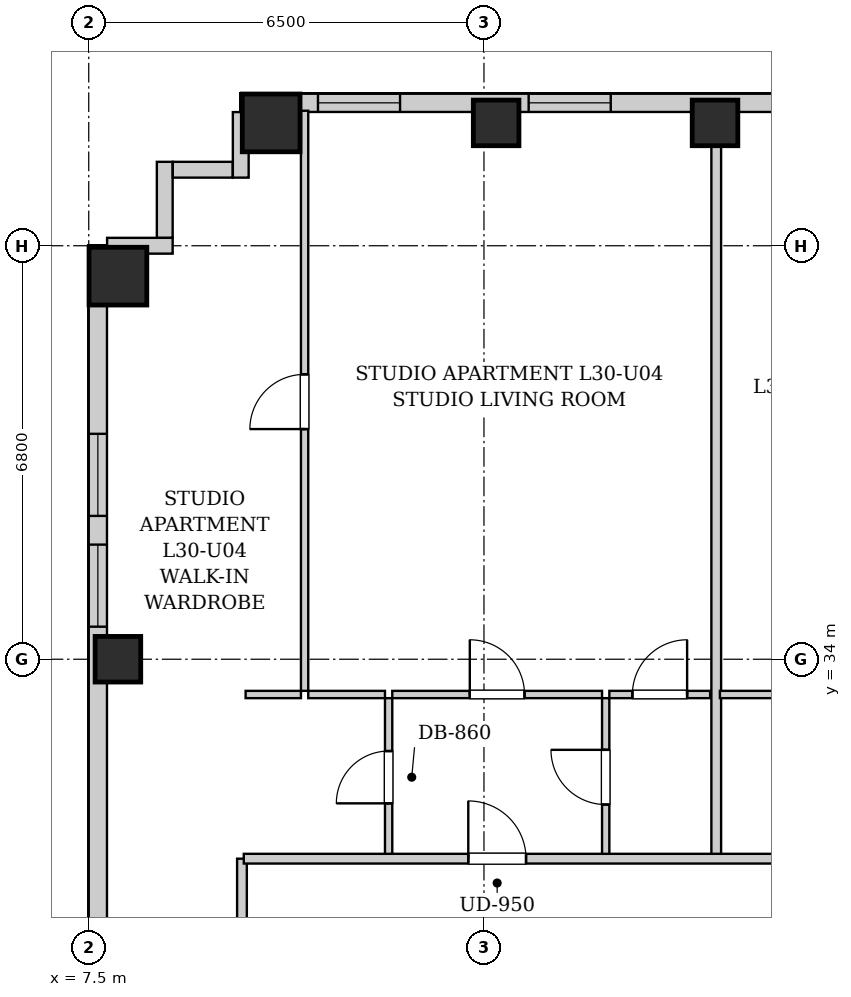
"""IFC4 building model, lengths in metres.
Left out: names, types, materials, properties, quantities, classifications, styles, units other than length and angle.
Written with IfcOpenShell. Run it as: python <this file> out.ifc"""

import sys

from ifc_helpers import new_model, si_unit, direction, frame, frame_2d, origin, origin_2d, place, context, subcontext, project, spatial, rectangle, extrude, element, fill, save


model = new_model("IFC4")
c1 = context("Model", 3, precision=1e-05, world=origin(), true_north=direction((0.0, 1.0)))
c2 = subcontext(c1, "Body", "Model", "MODEL_VIEW")
j1 = project(units=[si_unit("LENGTHUNIT", "METRE"), si_unit("PLANEANGLEUNIT", "RADIAN")], contexts=[c1])
p1 = place(None, origin())
s1 = spatial("IfcSite", under=j1, at=p1, CompositionType="ELEMENT")
p2 = place(p1, origin())
s2 = spatial("IfcBuilding", under=s1, at=p2, CompositionType="ELEMENT")
p3 = place(p2, frame((0.0, 0.0, 107.1)))
s3 = spatial("IfcBuildingStorey", under=s2, at=p3, CompositionType="ELEMENT", Elevation=107.1)
p4 = place(p3, frame((10.5, 42.82, 0.0), z_axis=(0.0, 0.0, 1.0), x_axis=(1.0, 0.0, 0.0)))
e1 = element("IfcColumn", 1, at=p4, inside=s3, PredefinedType="COLUMN", context=c2, shape_type="SweptSolid", body=[
    extrude(rectangle(XDim=0.95, YDim=0.95, at=origin_2d()), origin(), (0.0, 0.0, 1.0), 3.2),
])
for number, where, z_axis, x_axis in (
    (2, (14.2, 42.82, 0.0), (0.0, 0.0, 1.0), (1.0, 0.0, 0.0)),
    (3, (17.8, 42.82, 0.0), (0.0, 0.0, 1.0), (1.0, 0.0, 0.0)),
    (4, (7.98, 34.0, 0.0), (0.0, 0.0, 1.0), (1.0, 0.0, 0.0)),
):
    element("IfcColumn", number, at=place(p3, frame(where, z_axis=z_axis, x_axis=x_axis)), inside=s3, PredefinedType="COLUMN", context=c2, shape_type="SweptSolid", body=[
        extrude(rectangle(XDim=0.75, YDim=0.75, at=origin_2d()), origin(), (0.0, 0.0, 1.0), 3.2),
    ])
p5 = place(p3, frame((7.98, 40.3, 0.0), z_axis=(0.0, 0.0, 1.0), x_axis=(1.0, 0.0, 0.0)))
e5 = element("IfcColumn", 5, at=p5, inside=s3, PredefinedType="COLUMN", context=c2, shape_type="SweptSolid", body=[
    extrude(rectangle(XDim=0.95, YDim=0.95, at=origin_2d()), origin(), (0.0, 0.0, 1.0), 3.2),
])
p6 = place(p3, frame((10.0, 43.15, 0.0), z_axis=(0.0, 0.0, 1.0), x_axis=(1.0, 0.0, 0.0)))
e6 = element("IfcWall", 6, at=p6, inside=s3, PredefinedType="SOLIDWALL", context=c2, shape_type="SweptSolid", body=[
    extrude(rectangle(XDim=23.15, YDim=0.3, at=frame_2d((11.575, 0.0))), origin(), (0.0, 0.0, 1.0), 2.94),
])
p7 = place(p6, frame((4.735, 0.0, 0.55)))
e7 = element("IfcOpeningElement", 7, at=p7, cuts=e6, PredefinedType="OPENING", context=c2, shape_type="SweptSolid", body=[
    extrude(rectangle(XDim=1.35, YDim=1.2, at=frame_2d((0.675, 0.6))), frame((0.0, 0.16, 0.0), z_axis=(0.0, -1.0, 0.0), x_axis=(1.0, 0.0, 0.0)), (0.0, 0.0, 1.0), 0.32),
])
p8 = place(p6, frame((1.27, 0.0, 0.55)))
e8 = element("IfcOpeningElement", 8, at=p8, cuts=e6, PredefinedType="OPENING", context=c2, shape_type="SweptSolid", body=[
    extrude(rectangle(XDim=1.35, YDim=1.2, at=frame_2d((0.675, 0.6))), frame((0.0, 0.16, 0.0), z_axis=(0.0, -1.0, 0.0), x_axis=(1.0, 0.0, 0.0)), (0.0, 0.0, 1.0), 0.32),
])
p9 = place(p6, frame((9.773, 0.0, 0.55)))
e9 = element("IfcOpeningElement", 9, at=p9, cuts=e6, PredefinedType="OPENING", context=c2, shape_type="SweptSolid", body=[
    extrude(rectangle(XDim=1.35, YDim=1.2, at=frame_2d((0.675, 0.6))), frame((0.0, 0.16, 0.0), z_axis=(0.0, -1.0, 0.0), x_axis=(1.0, 0.0, 0.0)), (0.0, 0.0, 1.0), 0.32),
])
p10 = place(p6, frame((17.5, 0.0, 0.55)))
e10 = element("IfcOpeningElement", 10, at=p10, cuts=e6, PredefinedType="OPENING", context=c2, shape_type="SweptSolid", body=[
    extrude(rectangle(XDim=0.85, YDim=1.2, at=frame_2d((0.425, 0.6))), frame((0.0, 0.16, 0.0), z_axis=(0.0, -1.0, 0.0), x_axis=(1.0, 0.0, 0.0)), (0.0, 0.0, 1.0), 0.32),
])
p11 = place(p6, frame((19.393, 0.0, 0.55)))
e11 = element("IfcOpeningElement", 11, at=p11, cuts=e6, PredefinedType="OPENING", context=c2, shape_type="SweptSolid", body=[
    extrude(rectangle(XDim=1.35, YDim=1.2, at=frame_2d((0.675, 0.6))), frame((0.0, 0.16, 0.0), z_axis=(0.0, -1.0, 0.0), x_axis=(1.0, 0.0, 0.0)), (0.0, 0.0, 1.0), 0.32),
])
p12 = place(p3, frame((7.65, 19.4, 0.0), z_axis=(0.0, 0.0, 1.0), x_axis=(0.0, 1.0, 0.0)))
e12 = element("IfcWall", 12, at=p12, inside=s3, PredefinedType="SOLIDWALL", context=c2, shape_type="SweptSolid", body=[
    extrude(rectangle(XDim=21.4, YDim=0.3, at=frame_2d((10.7, 0.0))), origin(), (0.0, 0.0, 1.0), 2.94),
])
p13 = place(p12, frame((16.957, 0.0, 0.55)))
e13 = element("IfcOpeningElement", 13, at=p13, cuts=e12, PredefinedType="OPENING", context=c2, shape_type="SweptSolid", body=[
    extrude(rectangle(XDim=1.35, YDim=1.2, at=frame_2d((0.675, 0.6))), frame((0.0, 0.16, 0.0), z_axis=(0.0, -1.0, 0.0), x_axis=(1.0, 0.0, 0.0)), (0.0, 0.0, 1.0), 0.32),
])
p14 = place(p12, frame((15.135, 0.0, 0.55)))
e14 = element("IfcOpeningElement", 14, at=p14, cuts=e12, PredefinedType="OPENING", context=c2, shape_type="SweptSolid", body=[
    extrude(rectangle(XDim=1.35, YDim=1.2, at=frame_2d((0.675, 0.6))), frame((0.0, 0.16, 0.0), z_axis=(0.0, -1.0, 0.0), x_axis=(1.0, 0.0, 0.0)), (0.0, 0.0, 1.0), 0.32),
])
p15 = place(p3, frame((7.802, 40.8, 0.0), z_axis=(0.0, 0.0, 1.0), x_axis=(1.0, 0.0, 0.0)))
e15 = element("IfcWall", 15, at=p15, inside=s3, PredefinedType="SOLIDWALL", context=c2, shape_type="SweptSolid", body=[
    extrude(rectangle(XDim=1.078, YDim=0.26, at=frame_2d((0.539, 0.0))), origin(), (0.0, 0.0, 1.0), 2.94),
])
p16 = place(p3, frame((8.75, 40.932, 0.0), z_axis=(0.0, 0.0, 1.0), x_axis=(0.0, 1.0, 0.0)))
e16 = element("IfcWall", 16, at=p16, inside=s3, PredefinedType="SOLIDWALL", context=c2, shape_type="SweptSolid", body=[
    extrude(rectangle(XDim=1.248, YDim=0.26, at=frame_2d((0.624, 0.0))), origin(), (0.0, 0.0, 1.0), 2.94),
])
p17 = place(p3, frame((8.882, 42.05, 0.0), z_axis=(0.0, 0.0, 1.0), x_axis=(1.0, 0.0, 0.0)))
e17 = element("IfcWall", 17, at=p17, inside=s3, PredefinedType="SOLIDWALL", context=c2, shape_type="SweptSolid", body=[
    extrude(rectangle(XDim=0.986, YDim=0.26, at=frame_2d((0.493, 0.0))), origin(), (0.0, 0.0, 1.0), 2.94),
])
p18 = place(p3, frame((10.0, 41.92, 0.0), z_axis=(0.0, 0.0, 1.0), x_axis=(0.0, 1.0, 0.0)))
e18 = element("IfcWall", 18, at=p18, inside=s3, PredefinedType="SOLIDWALL", context=c2, shape_type="SweptSolid", body=[
    extrude(rectangle(XDim=1.078, YDim=0.26, at=frame_2d((0.539, 0.0))), origin(), (0.0, 0.0, 1.0), 2.94),
])
p19 = place(p3, frame((10.02, 28.98, 0.0), z_axis=(0.0, 0.0, 1.0), x_axis=(0.0, 1.0, 0.0)))
e19 = element("IfcWall", 19, at=p19, inside=s3, PredefinedType="PARTITIONING", context=c2, shape_type="SweptSolid", body=[
    extrude(rectangle(XDim=1.74, YDim=0.16, at=frame_2d((0.87, 0.0))), origin(), (0.0, 0.0, 1.0), 2.94),
])
p20 = place(p3, frame((12.432, 30.76, 0.0), z_axis=(0.0, 0.0, 1.0), x_axis=(0.0, 1.0, 0.0)))
e20 = element("IfcWall", 20, at=p20, inside=s3, PredefinedType="PARTITIONING", context=c2, shape_type="SweptSolid", body=[
    extrude(rectangle(XDim=2.6, YDim=0.12, at=frame_2d((1.3, 0.0))), origin(), (0.0, 0.0, 1.0), 2.94),
])
p21 = place(p20, frame((0.87, 0.0, 0.0)))
e21 = element("IfcOpeningElement", 21, at=p21, cuts=e20, PredefinedType="OPENING", context=c2, shape_type="SweptSolid", body=[
    extrude(rectangle(XDim=0.86, YDim=2.05, at=frame_2d((0.43, 1.025))), frame((0.0, 0.07, 0.0), z_axis=(0.0, -1.0, 0.0), x_axis=(1.0, 0.0, 0.0)), (0.0, 0.0, 1.0), 0.14),
])
p22 = place(p3, frame((10.08, 33.42, 0.0), z_axis=(0.0, 0.0, 1.0), x_axis=(1.0, 0.0, 0.0)))
e22 = element("IfcWall", 22, at=p22, inside=s3, PredefinedType="PARTITIONING", context=c2, shape_type="SweptSolid", body=[
    extrude(rectangle(XDim=0.91, YDim=0.12, at=frame_2d((0.455, 0.0))), origin(), (0.0, 0.0, 1.0), 2.94),
])
p23 = place(p3, frame((11.11, 33.42, 0.0), z_axis=(0.0, 0.0, 1.0), x_axis=(1.0, 0.0, 0.0)))
e23 = element("IfcWall", 23, at=p23, inside=s3, PredefinedType="PARTITIONING", context=c2, shape_type="SweptSolid", body=[
    extrude(rectangle(XDim=1.262, YDim=0.12, at=frame_2d((0.631, 0.0))), origin(), (0.0, 0.0, 1.0), 2.94),
])
p24 = place(p3, frame((16.002, 30.76, 0.0), z_axis=(0.0, 0.0, 1.0), x_axis=(0.0, 1.0, 0.0)))
e24 = element("IfcWall", 24, at=p24, inside=s3, PredefinedType="PARTITIONING", context=c2, shape_type="SweptSolid", body=[
    extrude(rectangle(XDim=2.6, YDim=0.12, at=frame_2d((1.3, 0.0))), origin(), (0.0, 0.0, 1.0), 2.94),
])
p25 = place(p24, frame((0.85, 0.0, 0.0)))
e25 = element("IfcOpeningElement", 25, at=p25, cuts=e24, PredefinedType="OPENING", context=c2, shape_type="SweptSolid", body=[
    extrude(rectangle(XDim=0.9, YDim=2.05, at=frame_2d((0.45, 1.025))), frame((0.0, 0.07, 0.0), z_axis=(0.0, -1.0, 0.0), x_axis=(1.0, 0.0, 0.0)), (0.0, 0.0, 1.0), 0.14),
])
p26 = place(p3, frame((12.492, 33.42, 0.0), z_axis=(0.0, 0.0, 1.0), x_axis=(1.0, 0.0, 0.0)))
e26 = element("IfcWall", 26, at=p26, inside=s3, PredefinedType="PARTITIONING", context=c2, shape_type="SweptSolid", body=[
    extrude(rectangle(XDim=3.45, YDim=0.12, at=frame_2d((1.725, 0.0))), origin(), (0.0, 0.0, 1.0), 2.94),
])
p27 = place(p26, frame((1.275, 0.0, 0.0)))
e27 = element("IfcOpeningElement", 27, at=p27, cuts=e26, PredefinedType="OPENING", context=c2, shape_type="SweptSolid", body=[
    extrude(rectangle(XDim=0.9, YDim=2.05, at=frame_2d((0.45, 1.025))), frame((0.0, 0.07, 0.0), z_axis=(0.0, -1.0, 0.0), x_axis=(1.0, 0.0, 0.0)), (0.0, 0.0, 1.0), 0.14),
])
p28 = place(p3, frame((16.062, 33.42, 0.0), z_axis=(0.0, 0.0, 1.0), x_axis=(1.0, 0.0, 0.0)))
e28 = element("IfcWall", 28, at=p28, inside=s3, PredefinedType="PARTITIONING", context=c2, shape_type="SweptSolid", body=[
    extrude(rectangle(XDim=1.658, YDim=0.12, at=frame_2d((0.829, 0.0))), origin(), (0.0, 0.0, 1.0), 2.94),
])
p29 = place(p28, frame((0.379, 0.0, 0.0)))
e29 = element("IfcOpeningElement", 29, at=p29, cuts=e28, PredefinedType="OPENING", context=c2, shape_type="SweptSolid", body=[
    extrude(rectangle(XDim=0.9, YDim=2.05, at=frame_2d((0.45, 1.025))), frame((0.0, 0.07, 0.0), z_axis=(0.0, -1.0, 0.0), x_axis=(1.0, 0.0, 0.0)), (0.0, 0.0, 1.0), 0.14),
])
p30 = place(p3, frame((11.05, 33.48, 0.0), z_axis=(0.0, 0.0, 1.0), x_axis=(0.0, 1.0, 0.0)))
e30 = element("IfcWall", 30, at=p30, inside=s3, PredefinedType="PARTITIONING", context=c2, shape_type="SweptSolid", body=[
    extrude(rectangle(XDim=9.54, YDim=0.12, at=frame_2d((4.77, 0.0))), origin(), (0.0, 0.0, 1.0), 2.94),
])
p31 = place(p30, frame((4.305, 0.0, 0.0)))
e31 = element("IfcOpeningElement", 31, at=p31, cuts=e30, PredefinedType="OPENING", context=c2, shape_type="SweptSolid", body=[
    extrude(rectangle(XDim=0.9, YDim=2.05, at=frame_2d((0.45, 1.025))), frame((0.0, 0.07, 0.0), z_axis=(0.0, -1.0, 0.0), x_axis=(1.0, 0.0, 0.0)), (0.0, 0.0, 1.0), 0.14),
])
p32 = place(p3, frame((17.82, 30.76, 0.0), z_axis=(0.0, 0.0, 1.0), x_axis=(0.0, 1.0, 0.0)))
e32 = element("IfcWall", 32, at=p32, inside=s3, PredefinedType="PARTITIONING", context=c2, shape_type="SweptSolid", body=[
    extrude(rectangle(XDim=12.26, YDim=0.16, at=frame_2d((6.13, 0.0))), origin(), (0.0, 0.0, 1.0), 2.313),
])
p33 = place(p3, frame((17.88, 33.42, 0.0), z_axis=(0.0, 0.0, 1.0), x_axis=(1.0, 0.0, 0.0)))
e33 = element("IfcWall", 33, at=p33, inside=s3, PredefinedType="PARTITIONING", context=c2, shape_type="SweptSolid", body=[
    extrude(rectangle(XDim=1.85, YDim=0.12, at=frame_2d((0.925, 0.0))), origin(), (0.0, 0.0, 1.0), 2.94),
])
p34 = place(p3, frame((10.05, 30.72, 0.0), z_axis=(0.0, 0.0, 1.0), x_axis=(1.0, 0.0, 0.0)))
e34 = element("IfcWall", 34, at=p34, inside=s3, PredefinedType="PARTITIONING", context=c2, shape_type="SweptSolid", body=[
    extrude(rectangle(XDim=30.8, YDim=0.16, at=frame_2d((15.4, 0.0))), origin(), (0.0, 0.0, 1.0), 2.94),
])
p35 = place(p34, frame((3.692, 0.0, 0.0)))
e35 = element("IfcOpeningElement", 35, at=p35, cuts=e34, PredefinedType="OPENING", context=c2, shape_type="SweptSolid", body=[
    extrude(rectangle(XDim=0.95, YDim=2.1, at=frame_2d((0.475, 1.05))), frame((0.0, 0.09, 0.0), z_axis=(0.0, -1.0, 0.0), x_axis=(1.0, 0.0, 0.0)), (0.0, 0.0, 1.0), 0.18),
])
p36 = place(p34, frame((11.785, 0.0, 0.0)))
e36 = element("IfcOpeningElement", 36, at=p36, cuts=e34, PredefinedType="OPENING", context=c2, shape_type="SweptSolid", body=[
    extrude(rectangle(XDim=0.95, YDim=2.1, at=frame_2d((0.475, 1.05))), frame((0.0, 0.09, 0.0), z_axis=(0.0, -1.0, 0.0), x_axis=(1.0, 0.0, 0.0)), (0.0, 0.0, 1.0), 0.18),
])
p37 = place(p34, frame((17.235, 0.0, 0.0)))
e37 = element("IfcOpeningElement", 37, at=p37, cuts=e34, PredefinedType="OPENING", context=c2, shape_type="SweptSolid", body=[
    extrude(rectangle(XDim=0.95, YDim=2.1, at=frame_2d((0.475, 1.05))), frame((0.0, 0.09, 0.0), z_axis=(0.0, -1.0, 0.0), x_axis=(1.0, 0.0, 0.0)), (0.0, 0.0, 1.0), 0.18),
])
p38 = place(p34, frame((28.64, 0.0, 0.0)))
e38 = element("IfcOpeningElement", 38, at=p38, cuts=e34, PredefinedType="OPENING", context=c2, shape_type="SweptSolid", body=[
    extrude(rectangle(XDim=0.95, YDim=2.1, at=frame_2d((0.475, 1.05))), frame((0.0, 0.09, 0.0), z_axis=(0.0, -1.0, 0.0), x_axis=(1.0, 0.0, 0.0)), (0.0, 0.0, 1.0), 0.18),
])
p39 = place(p21, origin())
e39 = element("IfcDoor", 39, at=p39, inside=s3, OperationType="SINGLE_SWING_LEFT", PredefinedType="DOOR", context=c2, shape_type="SweptSolid", body=[
    extrude(rectangle(XDim=0.86, YDim=2.05, at=frame_2d((0.43, 1.025))), frame((0.0, 0.025, 0.0), z_axis=(0.0, -1.0, 0.0), x_axis=(1.0, 0.0, 0.0)), (0.0, 0.0, 1.0), 0.05),
])
fill(e21, e39)
p40 = place(p25, origin())
e40 = element("IfcDoor", 40, at=p40, inside=s3, OperationType="SINGLE_SWING_RIGHT", PredefinedType="DOOR", context=c2, shape_type="SweptSolid", body=[
    extrude(rectangle(XDim=0.9, YDim=2.05, at=frame_2d((0.45, 1.025))), frame((0.0, 0.025, 0.0), z_axis=(0.0, -1.0, 0.0), x_axis=(1.0, 0.0, 0.0)), (0.0, 0.0, 1.0), 0.05),
])
fill(e25, e40)
p41 = place(p27, origin())
e41 = element("IfcDoor", 41, at=p41, inside=s3, OperationType="SINGLE_SWING_LEFT", PredefinedType="DOOR", context=c2, shape_type="SweptSolid", body=[
    extrude(rectangle(XDim=0.9, YDim=2.05, at=frame_2d((0.45, 1.025))), frame((0.0, 0.025, 0.0), z_axis=(0.0, -1.0, 0.0), x_axis=(1.0, 0.0, 0.0)), (0.0, 0.0, 1.0), 0.05),
])
fill(e27, e41)
p42 = place(p29, origin())
e42 = element("IfcDoor", 42, at=p42, inside=s3, OperationType="SINGLE_SWING_RIGHT", PredefinedType="DOOR", context=c2, shape_type="SweptSolid", body=[
    extrude(rectangle(XDim=0.9, YDim=2.05, at=frame_2d((0.45, 1.025))), frame((0.0, 0.025, 0.0), z_axis=(0.0, -1.0, 0.0), x_axis=(1.0, 0.0, 0.0)), (0.0, 0.0, 1.0), 0.05),
])
fill(e29, e42)
p43 = place(p31, origin())
e43 = element("IfcDoor", 43, at=p43, inside=s3, OperationType="SINGLE_SWING_LEFT", PredefinedType="DOOR", context=c2, shape_type="SweptSolid", body=[
    extrude(rectangle(XDim=0.9, YDim=2.05, at=frame_2d((0.45, 1.025))), frame((0.0, 0.025, 0.0), z_axis=(0.0, -1.0, 0.0), x_axis=(1.0, 0.0, 0.0)), (0.0, 0.0, 1.0), 0.05),
])
fill(e31, e43)
p44 = place(p35, origin())
e44 = element("IfcDoor", 44, at=p44, inside=s3, OperationType="SINGLE_SWING_LEFT", PredefinedType="DOOR", context=c2, shape_type="SweptSolid", body=[
    extrude(rectangle(XDim=0.95, YDim=2.1, at=frame_2d((0.475, 1.05))), frame((0.0, 0.025, 0.0), z_axis=(0.0, -1.0, 0.0), x_axis=(1.0, 0.0, 0.0)), (0.0, 0.0, 1.0), 0.05),
])
fill(e35, e44)
p45 = place(p13, origin())
e45 = element("IfcWindow", 45, at=p45, inside=s3, PartitioningType="SINGLE_PANEL", PredefinedType="WINDOW", context=c2, shape_type="SweptSolid", body=[
    extrude(rectangle(XDim=1.35, YDim=1.2, at=frame_2d((0.675, 0.6))), frame((0.0, 0.03, 0.0), z_axis=(0.0, -1.0, 0.0), x_axis=(1.0, 0.0, 0.0)), (0.0, 0.0, 1.0), 0.06),
])
fill(e13, e45)
p46 = place(p14, origin())
e46 = element("IfcWindow", 46, at=p46, inside=s3, PartitioningType="SINGLE_PANEL", PredefinedType="WINDOW", context=c2, shape_type="SweptSolid", body=[
    extrude(rectangle(XDim=1.35, YDim=1.2, at=frame_2d((0.675, 0.6))), frame((0.0, 0.03, 0.0), z_axis=(0.0, -1.0, 0.0), x_axis=(1.0, 0.0, 0.0)), (0.0, 0.0, 1.0), 0.06),
])
fill(e14, e46)
p47 = place(p7, origin())
e47 = element("IfcWindow", 47, at=p47, inside=s3, PartitioningType="SINGLE_PANEL", PredefinedType="WINDOW", context=c2, shape_type="SweptSolid", body=[
    extrude(rectangle(XDim=1.35, YDim=1.2, at=frame_2d((0.675, 0.6))), frame((0.0, 0.03, 0.0), z_axis=(0.0, -1.0, 0.0), x_axis=(1.0, 0.0, 0.0)), (0.0, 0.0, 1.0), 0.06),
])
fill(e7, e47)
p48 = place(p8, origin())
e48 = element("IfcWindow", 48, at=p48, inside=s3, PartitioningType="SINGLE_PANEL", PredefinedType="WINDOW", context=c2, shape_type="SweptSolid", body=[
    extrude(rectangle(XDim=1.35, YDim=1.2, at=frame_2d((0.675, 0.6))), frame((0.0, 0.03, 0.0), z_axis=(0.0, -1.0, 0.0), x_axis=(1.0, 0.0, 0.0)), (0.0, 0.0, 1.0), 0.06),
])
fill(e8, e48)
save(model, sys.argv[1])
